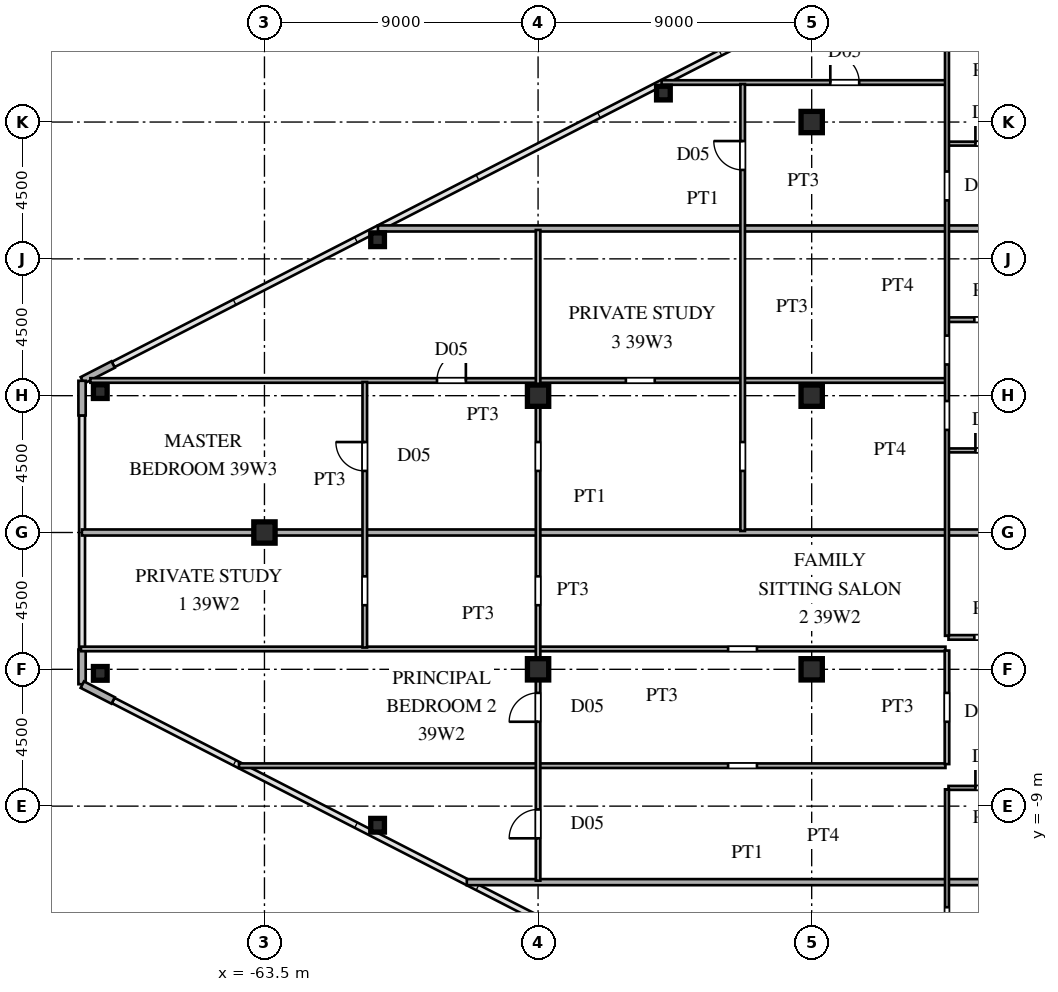
"""IFC4 building model, lengths in metres.
Left out: names, types, materials, properties, quantities, classifications, styles, units other than length and angle.
Written with IfcOpenShell. Run it as: python <this file> out.ifc"""

import sys

from ifc_helpers import new_model, si_unit, direction, frame, frame_2d, origin, origin_2d, place, context, subcontext, project, spatial, rectangle, hollow_rectangle, i_section, extrude, source, transform, mapped, element, fill, save


model = new_model("IFC4")
c1 = context("Model", 3, precision=1e-05, world=origin(), true_north=direction((0.0, 1.0)))
c2 = subcontext(c1, "Body", "Model", "MODEL_VIEW")
j1 = project(units=[si_unit("LENGTHUNIT", "METRE"), si_unit("PLANEANGLEUNIT", "RADIAN")], contexts=[c1])
p1 = place(None, origin())
s1 = spatial("IfcSite", under=j1, at=p1, CompositionType="ELEMENT")
p2 = place(p1, origin())
s2 = spatial("IfcBuilding", under=s1, at=p2, CompositionType="ELEMENT")
p3 = place(p2, frame((0.0, 0.0, 147.6)))
s3 = spatial("IfcBuildingStorey", under=s2, at=p3, CompositionType="ELEMENT", Elevation=147.6)
m1 = source(origin(), c2, "Body", "SweptSolid", [
    extrude(i_section(OverallWidth=0.7, OverallDepth=0.7, WebThickness=0.028, FlangeThickness=0.045, at=origin_2d()), origin(), (0.0, 0.0, 1.0), 3.6),
])
for number, where, z_axis, x_axis in (
    (1, (-45.5, -4.5, 0.0), (0.0, 0.0, 1.0), (1.0, 0.0, 0.0)),
    (2, (-45.5, 4.5, 0.0), (0.0, 0.0, 1.0), (1.0, 0.0, 0.0)),
    (3, (-45.5, 13.5, 0.0), (0.0, 0.0, 1.0), (1.0, 0.0, 0.0)),
    (4, (-54.5, -4.5, 0.0), (0.0, 0.0, 1.0), (1.0, 0.0, 0.0)),
    (5, (-54.5, 4.5, 0.0), (0.0, 0.0, 1.0), (1.0, 0.0, 0.0)),
    (6, (-63.5, 0.0, 0.0), (0.0, 0.0, 1.0), (1.0, 0.0, 0.0)),
):
    element("IfcColumn", number, at=place(p3, frame(where, z_axis=z_axis, x_axis=x_axis)), inside=s3, PredefinedType="COLUMN", context=c2, shape_type="MappedRepresentation", body=[
        mapped(m1, transform((0.0, 0.0, 0.0), scale=1.0)),
    ])
m2 = source(origin(), c2, "Body", "SweptSolid", [
    extrude(hollow_rectangle(XDim=0.45, YDim=0.45, WallThickness=0.018, at=origin_2d()), origin(), (0.0, 0.0, 1.0), 3.6),
])
for number, where, z_axis, x_axis in (
    (7, (-68.9, 4.634, 0.0), (0.0, 0.0, 1.0), (1.0, 0.0, 0.0)),
    (8, (-68.9, -4.634, 0.0), (0.0, 0.0, 1.0), (1.0, 0.0, 0.0)),
    (9, (-59.779, -9.629, 0.0), (0.0, 0.0, 1.0), (1.0, 0.0, 0.0)),
    (10, (-50.377, 14.453, 0.0), (0.0, 0.0, 1.0), (1.0, 0.0, 0.0)),
    (11, (-59.779, 9.629, 0.0), (0.0, 0.0, 1.0), (1.0, 0.0, 0.0)),
):
    element("IfcColumn", number, at=place(p3, frame(where, z_axis=z_axis, x_axis=x_axis)), inside=s3, PredefinedType="COLUMN", context=c2, shape_type="MappedRepresentation", body=[
        mapped(m2, transform((0.0, 0.0, 0.0), scale=1.0)),
    ])
p4 = place(p3, frame((-68.477, 5.525, 0.0), z_axis=(0.0, 0.0, 1.0), x_axis=(-0.889797395748, -0.456355776255, 0.0)))
e12 = element("IfcWall", 12, at=p4, inside=s3, PredefinedType="SOLIDWALL", context=c2, shape_type="SweptSolid", body=[
    extrude(rectangle(XDim=1.14, YDim=0.24, at=frame_2d((0.57, 0.0))), origin(), (0.0, 0.0, 1.0), 3.38),
])
for number, where, z_axis, x_axis in (
    (13, (-69.5, 4.99, 0.0), (0.0, 0.0, 1.0), (0.0, -1.0, 0.0)),
    (14, (-69.5, -3.85, 0.0), (0.0, 0.0, 1.0), (0.0, -1.0, 0.0)),
):
    element("IfcWall", number, at=place(p3, frame(where, z_axis=z_axis, x_axis=x_axis)), inside=s3, PredefinedType="SOLIDWALL", context=c2, shape_type="SweptSolid", body=[
        extrude(rectangle(XDim=1.14, YDim=0.24, at=frame_2d((0.57, 0.0))), origin(), (0.0, 0.0, 1.0), 3.38),
    ])
p5 = place(p3, frame((-69.491, -5.005, 0.0), z_axis=(0.0, 0.0, 1.0), x_axis=(0.889797395748, -0.456355776255, 0.0)))
e15 = element("IfcWall", 15, at=p5, inside=s3, PredefinedType="SOLIDWALL", context=c2, shape_type="SweptSolid", body=[
    extrude(rectangle(XDim=1.14, YDim=0.24, at=frame_2d((0.57, 0.0))), origin(), (0.0, 0.0, 1.0), 3.38),
])
p6 = place(p3, frame((-56.844, -11.5, 0.0), z_axis=(0.0, 0.0, 1.0), x_axis=(1.0, 0.0, 0.0)))
e16 = element("IfcWall", 16, at=p6, inside=s3, PredefinedType="PARTITIONING", context=c2, shape_type="SweptSolid", body=[
    extrude(rectangle(XDim=18.464, YDim=0.2, at=frame_2d((9.232, 0.0))), origin(), (0.0, 0.0, 1.0), 3.38),
])
p7 = place(p3, frame((-41.0, -8.4, 0.0), z_axis=(0.0, 0.0, 1.0), x_axis=(1.0, 0.0, 0.0)))
e17 = element("IfcWall", 17, at=p7, inside=s3, PredefinedType="PARTITIONING", context=c2, shape_type="SweptSolid", body=[
    extrude(rectangle(XDim=2.65, YDim=0.13, at=frame_2d((1.325, 0.0))), origin(), (0.0, 0.0, 1.0), 3.38),
])
p8 = place(p7, frame((0.885, 0.0, 0.0)))
e18 = element("IfcOpeningElement", 18, at=p8, cuts=e17, PredefinedType="OPENING", context=c2, shape_type="SweptSolid", body=[
    extrude(rectangle(XDim=0.88, YDim=2.1, at=frame_2d((0.44, 1.05))), frame((0.0, 0.075, 0.0), z_axis=(0.0, -1.0, 0.0), x_axis=(1.0, 0.0, 0.0)), (0.0, 0.0, 1.0), 0.15),
])
p9 = place(p3, frame((-64.338, -7.67, 0.0), z_axis=(0.0, 0.0, 1.0), x_axis=(1.0, 0.0, 0.0)))
e19 = element("IfcWall", 19, at=p9, inside=s3, PredefinedType="PARTITIONING", context=c2, shape_type="SweptSolid", body=[
    extrude(rectangle(XDim=23.238, YDim=0.15, at=frame_2d((11.619, 0.0))), origin(), (0.0, 0.0, 1.0), 3.38),
])
p10 = place(p9, frame((16.088, 0.0, 0.0)))
e20 = element("IfcOpeningElement", 20, at=p10, cuts=e19, PredefinedType="OPENING", context=c2, shape_type="SweptSolid", body=[
    extrude(rectangle(XDim=0.95, YDim=2.15, at=frame_2d((0.475, 1.075))), frame((0.0, 0.085, 0.0), z_axis=(0.0, -1.0, 0.0), x_axis=(1.0, 0.0, 0.0)), (0.0, 0.0, 1.0), 0.17),
])
p11 = place(p3, frame((-69.535, -3.83, 0.0), z_axis=(0.0, 0.0, 1.0), x_axis=(1.0, 0.0, 0.0)))
e21 = element("IfcWall", 21, at=p11, inside=s3, PredefinedType="PARTITIONING", context=c2, shape_type="SweptSolid", body=[
    extrude(rectangle(XDim=28.435, YDim=0.15, at=frame_2d((14.217, 0.0))), origin(), (0.0, 0.0, 1.0), 3.38),
])
p12 = place(p11, frame((21.285, 0.0, 0.0)))
e22 = element("IfcOpeningElement", 22, at=p12, cuts=e21, PredefinedType="OPENING", context=c2, shape_type="SweptSolid", body=[
    extrude(rectangle(XDim=0.95, YDim=2.15, at=frame_2d((0.475, 1.075))), frame((0.0, 0.085, 0.0), z_axis=(0.0, -1.0, 0.0), x_axis=(1.0, 0.0, 0.0)), (0.0, 0.0, 1.0), 0.17),
])
p13 = place(p3, frame((-41.0, -3.45, 0.0), z_axis=(0.0, 0.0, 1.0), x_axis=(1.0, 0.0, 0.0)))
e23 = element("IfcWall", 23, at=p13, inside=s3, PredefinedType="PARTITIONING", context=c2, shape_type="SweptSolid", body=[
    extrude(rectangle(XDim=2.65, YDim=0.15, at=frame_2d((1.325, 0.0))), origin(), (0.0, 0.0, 1.0), 3.38),
])
p14 = place(p13, frame((0.85, 0.0, 0.0)))
e24 = element("IfcOpeningElement", 24, at=p14, cuts=e23, PredefinedType="OPENING", context=c2, shape_type="SweptSolid", body=[
    extrude(rectangle(XDim=0.95, YDim=2.15, at=frame_2d((0.475, 1.075))), frame((0.0, 0.085, 0.0), z_axis=(0.0, -1.0, 0.0), x_axis=(1.0, 0.0, 0.0)), (0.0, 0.0, 1.0), 0.17),
])
p15 = place(p3, frame((-69.505, 0.0, 0.0), z_axis=(0.0, 0.0, 1.0), x_axis=(1.0, 0.0, 0.0)))
e25 = element("IfcWall", 25, at=p15, inside=s3, PredefinedType="PARTITIONING", context=c2, shape_type="SweptSolid", body=[
    extrude(rectangle(XDim=31.125, YDim=0.2, at=frame_2d((15.562, 0.0))), origin(), (0.0, 0.0, 1.0), 3.38),
])
p16 = place(p3, frame((-41.0, 2.7, 0.0), z_axis=(0.0, 0.0, 1.0), x_axis=(1.0, 0.0, 0.0)))
e26 = element("IfcWall", 26, at=p16, inside=s3, PredefinedType="PARTITIONING", context=c2, shape_type="SweptSolid", body=[
    extrude(rectangle(XDim=2.65, YDim=0.13, at=frame_2d((1.325, 0.0))), origin(), (0.0, 0.0, 1.0), 3.38),
])
p17 = place(p16, frame((0.885, 0.0, 0.0)))
e27 = element("IfcOpeningElement", 27, at=p17, cuts=e26, PredefinedType="OPENING", context=c2, shape_type="SweptSolid", body=[
    extrude(rectangle(XDim=0.88, YDim=2.1, at=frame_2d((0.44, 1.05))), frame((0.0, 0.075, 0.0), z_axis=(0.0, -1.0, 0.0), x_axis=(1.0, 0.0, 0.0)), (0.0, 0.0, 1.0), 0.15),
])
p18 = place(p3, frame((-69.226, 5.0, 0.0), z_axis=(0.0, 0.0, 1.0), x_axis=(1.0, 0.0, 0.0)))
e28 = element("IfcWall", 28, at=p18, inside=s3, PredefinedType="PARTITIONING", context=c2, shape_type="SweptSolid", body=[
    extrude(rectangle(XDim=28.126, YDim=0.15, at=frame_2d((14.063, 0.0))), origin(), (0.0, 0.0, 1.0), 3.38),
])
p19 = place(p18, frame((11.401, 0.0, 0.0)))
e29 = element("IfcOpeningElement", 29, at=p19, cuts=e28, PredefinedType="OPENING", context=c2, shape_type="SweptSolid", body=[
    extrude(rectangle(XDim=0.95, YDim=2.15, at=frame_2d((0.475, 1.075))), frame((0.0, 0.085, 0.0), z_axis=(0.0, -1.0, 0.0), x_axis=(1.0, 0.0, 0.0)), (0.0, 0.0, 1.0), 0.17),
])
p20 = place(p18, frame((17.614, 0.0, 0.0)))
e30 = element("IfcOpeningElement", 30, at=p20, cuts=e28, PredefinedType="OPENING", context=c2, shape_type="SweptSolid", body=[
    extrude(rectangle(XDim=0.95, YDim=2.15, at=frame_2d((0.475, 1.075))), frame((0.0, 0.085, 0.0), z_axis=(0.0, -1.0, 0.0), x_axis=(1.0, 0.0, 0.0)), (0.0, 0.0, 1.0), 0.17),
])
p21 = place(p3, frame((-41.0, 7.0, 0.0), z_axis=(0.0, 0.0, 1.0), x_axis=(1.0, 0.0, 0.0)))
e31 = element("IfcWall", 31, at=p21, inside=s3, PredefinedType="PARTITIONING", context=c2, shape_type="SweptSolid", body=[
    extrude(rectangle(XDim=2.65, YDim=0.15, at=frame_2d((1.325, 0.0))), origin(), (0.0, 0.0, 1.0), 3.38),
])
p22 = place(p21, frame((0.85, 0.0, 0.0)))
e32 = element("IfcOpeningElement", 32, at=p22, cuts=e31, PredefinedType="OPENING", context=c2, shape_type="SweptSolid", body=[
    extrude(rectangle(XDim=0.95, YDim=2.15, at=frame_2d((0.475, 1.075))), frame((0.0, 0.085, 0.0), z_axis=(0.0, -1.0, 0.0), x_axis=(1.0, 0.0, 0.0)), (0.0, 0.0, 1.0), 0.17),
])
p23 = place(p3, frame((-59.767, 10.0, 0.0), z_axis=(0.0, 0.0, 1.0), x_axis=(1.0, 0.0, 0.0)))
e33 = element("IfcWall", 33, at=p23, inside=s3, PredefinedType="PARTITIONING", context=c2, shape_type="SweptSolid", body=[
    extrude(rectangle(XDim=21.387, YDim=0.2, at=frame_2d((10.694, 0.0))), origin(), (0.0, 0.0, 1.0), 3.38),
])
p24 = place(p3, frame((-41.0, 12.79, 0.0), z_axis=(0.0, 0.0, 1.0), x_axis=(1.0, 0.0, 0.0)))
e34 = element("IfcWall", 34, at=p24, inside=s3, PredefinedType="PARTITIONING", context=c2, shape_type="SweptSolid", body=[
    extrude(rectangle(XDim=2.65, YDim=0.13, at=frame_2d((1.325, 0.0))), origin(), (0.0, 0.0, 1.0), 3.38),
])
p25 = place(p24, frame((0.885, 0.0, 0.0)))
e35 = element("IfcOpeningElement", 35, at=p25, cuts=e34, PredefinedType="OPENING", context=c2, shape_type="SweptSolid", body=[
    extrude(rectangle(XDim=0.88, YDim=2.1, at=frame_2d((0.44, 1.05))), frame((0.0, 0.075, 0.0), z_axis=(0.0, -1.0, 0.0), x_axis=(1.0, 0.0, 0.0)), (0.0, 0.0, 1.0), 0.15),
])
p26 = place(p3, frame((-50.438, 14.8, 0.0), z_axis=(0.0, 0.0, 1.0), x_axis=(1.0, 0.0, 0.0)))
e36 = element("IfcWall", 36, at=p26, inside=s3, PredefinedType="PARTITIONING", context=c2, shape_type="SweptSolid", body=[
    extrude(rectangle(XDim=9.338, YDim=0.15, at=frame_2d((4.669, 0.0))), origin(), (0.0, 0.0, 1.0), 3.38),
])
p27 = place(p26, frame((5.551, 0.0, 0.0)))
e37 = element("IfcOpeningElement", 37, at=p27, cuts=e36, PredefinedType="OPENING", context=c2, shape_type="SweptSolid", body=[
    extrude(rectangle(XDim=0.95, YDim=2.15, at=frame_2d((0.475, 1.075))), frame((0.0, 0.085, 0.0), z_axis=(0.0, -1.0, 0.0), x_axis=(1.0, 0.0, 0.0)), (0.0, 0.0, 1.0), 0.17),
])
p28 = place(p3, frame((-60.2, -3.783, 0.0), z_axis=(0.0, 0.0, 1.0), x_axis=(0.0, 1.0, 0.0)))
e38 = element("IfcWall", 38, at=p28, inside=s3, PredefinedType="PARTITIONING", context=c2, shape_type="SweptSolid", body=[
    extrude(rectangle(XDim=8.733, YDim=0.15, at=frame_2d((4.366, 0.0))), origin(), (0.0, 0.0, 1.0), 3.38),
])
p29 = place(p28, frame((1.391, 0.0, 0.0)))
e39 = element("IfcOpeningElement", 39, at=p29, cuts=e38, PredefinedType="OPENING", context=c2, shape_type="SweptSolid", body=[
    extrude(rectangle(XDim=0.95, YDim=2.15, at=frame_2d((0.475, 1.075))), frame((0.0, 0.085, 0.0), z_axis=(0.0, -1.0, 0.0), x_axis=(1.0, 0.0, 0.0)), (0.0, 0.0, 1.0), 0.17),
])
p30 = place(p28, frame((5.808, 0.0, 0.0)))
e40 = element("IfcOpeningElement", 40, at=p30, cuts=e38, PredefinedType="OPENING", context=c2, shape_type="SweptSolid", body=[
    extrude(rectangle(XDim=0.95, YDim=2.15, at=frame_2d((0.475, 1.075))), frame((0.0, 0.085, 0.0), z_axis=(0.0, -1.0, 0.0), x_axis=(1.0, 0.0, 0.0)), (0.0, 0.0, 1.0), 0.17),
])
p31 = place(p3, frame((-54.5, -11.45, 0.0), z_axis=(0.0, 0.0, 1.0), x_axis=(0.0, 1.0, 0.0)))
e41 = element("IfcWall", 41, at=p31, inside=s3, PredefinedType="PARTITIONING", context=c2, shape_type="SweptSolid", body=[
    extrude(rectangle(XDim=21.4, YDim=0.15, at=frame_2d((10.7, 0.0))), origin(), (0.0, 0.0, 1.0), 2.78),
])
p32 = place(p31, frame((5.225, 0.0, 0.0)))
e42 = element("IfcOpeningElement", 42, at=p32, cuts=e41, PredefinedType="OPENING", context=c2, shape_type="SweptSolid", body=[
    extrude(rectangle(XDim=0.95, YDim=2.15, at=frame_2d((0.475, 1.075))), frame((0.0, 0.085, 0.0), z_axis=(0.0, -1.0, 0.0), x_axis=(1.0, 0.0, 0.0)), (0.0, 0.0, 1.0), 0.17),
])
p33 = place(p31, frame((1.392, 0.0, 0.0)))
e43 = element("IfcOpeningElement", 43, at=p33, cuts=e41, PredefinedType="OPENING", context=c2, shape_type="SweptSolid", body=[
    extrude(rectangle(XDim=0.95, YDim=2.15, at=frame_2d((0.475, 1.075))), frame((0.0, 0.085, 0.0), z_axis=(0.0, -1.0, 0.0), x_axis=(1.0, 0.0, 0.0)), (0.0, 0.0, 1.0), 0.17),
])
p34 = place(p31, frame((9.058, 0.0, 0.0)))
e44 = element("IfcOpeningElement", 44, at=p34, cuts=e41, PredefinedType="OPENING", context=c2, shape_type="SweptSolid", body=[
    extrude(rectangle(XDim=0.95, YDim=2.15, at=frame_2d((0.475, 1.075))), frame((0.0, 0.085, 0.0), z_axis=(0.0, -1.0, 0.0), x_axis=(1.0, 0.0, 0.0)), (0.0, 0.0, 1.0), 0.17),
])
p35 = place(p31, frame((13.475, 0.0, 0.0)))
e45 = element("IfcOpeningElement", 45, at=p35, cuts=e41, PredefinedType="OPENING", context=c2, shape_type="SweptSolid", body=[
    extrude(rectangle(XDim=0.95, YDim=2.15, at=frame_2d((0.475, 1.075))), frame((0.0, 0.085, 0.0), z_axis=(0.0, -1.0, 0.0), x_axis=(1.0, 0.0, 0.0)), (0.0, 0.0, 1.0), 0.17),
])
p36 = place(p3, frame((-47.77, 0.05, 0.0), z_axis=(0.0, 0.0, 1.0), x_axis=(0.0, 1.0, 0.0)))
e46 = element("IfcWall", 46, at=p36, inside=s3, PredefinedType="PARTITIONING", context=c2, shape_type="SweptSolid", body=[
    extrude(rectangle(XDim=14.7, YDim=0.15, at=frame_2d((7.35, 0.0))), origin(), (0.0, 0.0, 1.0), 3.38),
])
p37 = place(p36, frame((1.975, 0.0, 0.0)))
e47 = element("IfcOpeningElement", 47, at=p37, cuts=e46, PredefinedType="OPENING", context=c2, shape_type="SweptSolid", body=[
    extrude(rectangle(XDim=0.95, YDim=2.15, at=frame_2d((0.475, 1.075))), frame((0.0, 0.085, 0.0), z_axis=(0.0, -1.0, 0.0), x_axis=(1.0, 0.0, 0.0)), (0.0, 0.0, 1.0), 0.17),
])
p38 = place(p36, frame((11.875, 0.0, 0.0)))
e48 = element("IfcOpeningElement", 48, at=p38, cuts=e46, PredefinedType="OPENING", context=c2, shape_type="SweptSolid", body=[
    extrude(rectangle(XDim=0.95, YDim=2.15, at=frame_2d((0.475, 1.075))), frame((0.0, 0.085, 0.0), z_axis=(0.0, -1.0, 0.0), x_axis=(1.0, 0.0, 0.0)), (0.0, 0.0, 1.0), 0.17),
])
p39 = place(p3, frame((-41.05, -19.634, 0.0), z_axis=(0.0, 0.0, 1.0), x_axis=(0.0, 1.0, 0.0)))
e49 = element("IfcWall", 49, at=p39, inside=s3, PredefinedType="PARTITIONING", context=c2, shape_type="SweptSolid", body=[
    extrude(rectangle(XDim=11.187, YDim=0.13, at=frame_2d((5.594, 0.0))), origin(), (0.0, 0.0, 1.0), 2.99),
])
p40 = place(p39, frame((6.359, 0.0, 0.0)))
e50 = element("IfcOpeningElement", 50, at=p40, cuts=e49, PredefinedType="OPENING", context=c2, shape_type="SweptSolid", body=[
    extrude(rectangle(XDim=0.95, YDim=2.15, at=frame_2d((0.475, 1.075))), frame((0.0, 0.075, 0.0), z_axis=(0.0, -1.0, 0.0), x_axis=(1.0, 0.0, 0.0)), (0.0, 0.0, 1.0), 0.15),
])
p41 = place(p39, frame((0.809, 0.0, 0.0)))
e51 = element("IfcOpeningElement", 51, at=p41, cuts=e49, PredefinedType="OPENING", context=c2, shape_type="SweptSolid", body=[
    extrude(rectangle(XDim=0.95, YDim=2.15, at=frame_2d((0.475, 1.075))), frame((0.0, 0.075, 0.0), z_axis=(0.0, -1.0, 0.0), x_axis=(1.0, 0.0, 0.0)), (0.0, 0.0, 1.0), 0.15),
])
p42 = place(p3, frame((-41.05, -7.617, 0.0), z_axis=(0.0, 0.0, 1.0), x_axis=(0.0, 1.0, 0.0)))
e52 = element("IfcWall", 52, at=p42, inside=s3, PredefinedType="PARTITIONING", context=c2, shape_type="SweptSolid", body=[
    extrude(rectangle(XDim=3.734, YDim=0.15, at=frame_2d((1.867, 0.0))), origin(), (0.0, 0.0, 1.0), 2.99),
])
p43 = place(p42, frame((1.392, 0.0, 0.0)))
e53 = element("IfcOpeningElement", 53, at=p43, cuts=e52, PredefinedType="OPENING", context=c2, shape_type="SweptSolid", body=[
    extrude(rectangle(XDim=0.95, YDim=2.15, at=frame_2d((0.475, 1.075))), frame((0.0, 0.085, 0.0), z_axis=(0.0, -1.0, 0.0), x_axis=(1.0, 0.0, 0.0)), (0.0, 0.0, 1.0), 0.17),
])
p44 = place(p3, frame((-41.05, -3.398, 0.0), z_axis=(0.0, 0.0, 1.0), x_axis=(0.0, 1.0, 0.0)))
e54 = element("IfcWall", 54, at=p44, inside=s3, PredefinedType="PARTITIONING", context=c2, shape_type="SweptSolid", body=[
    extrude(rectangle(XDim=23.032, YDim=0.13, at=frame_2d((11.516, 0.0))), origin(), (0.0, 0.0, 1.0), 2.99),
])
p45 = place(p44, frame((6.772, 0.0, 0.0)))
e55 = element("IfcOpeningElement", 55, at=p45, cuts=e54, PredefinedType="OPENING", context=c2, shape_type="SweptSolid", body=[
    extrude(rectangle(XDim=0.95, YDim=2.15, at=frame_2d((0.475, 1.075))), frame((0.0, 0.075, 0.0), z_axis=(0.0, -1.0, 0.0), x_axis=(1.0, 0.0, 0.0)), (0.0, 0.0, 1.0), 0.15),
])
p46 = place(p44, frame((8.924, 0.0, 0.0)))
e56 = element("IfcOpeningElement", 56, at=p46, cuts=e54, PredefinedType="OPENING", context=c2, shape_type="SweptSolid", body=[
    extrude(rectangle(XDim=0.95, YDim=2.15, at=frame_2d((0.475, 1.075))), frame((0.0, 0.075, 0.0), z_axis=(0.0, -1.0, 0.0), x_axis=(1.0, 0.0, 0.0)), (0.0, 0.0, 1.0), 0.15),
])
p47 = place(p44, frame((14.321, 0.0, 0.0)))
e57 = element("IfcOpeningElement", 57, at=p47, cuts=e54, PredefinedType="OPENING", context=c2, shape_type="SweptSolid", body=[
    extrude(rectangle(XDim=0.95, YDim=2.15, at=frame_2d((0.475, 1.075))), frame((0.0, 0.075, 0.0), z_axis=(0.0, -1.0, 0.0), x_axis=(1.0, 0.0, 0.0)), (0.0, 0.0, 1.0), 0.15),
])
p48 = place(p44, frame((21.273, 0.0, 0.0)))
e58 = element("IfcOpeningElement", 58, at=p48, cuts=e54, PredefinedType="OPENING", context=c2, shape_type="SweptSolid", body=[
    extrude(rectangle(XDim=0.95, YDim=2.15, at=frame_2d((0.475, 1.075))), frame((0.0, 0.075, 0.0), z_axis=(0.0, -1.0, 0.0), x_axis=(1.0, 0.0, 0.0)), (0.0, 0.0, 1.0), 0.15),
])
m3 = source(origin(), c2, "Body", "SweptSolid", [
    extrude(rectangle(XDim=0.88, YDim=2.1, at=frame_2d((0.44, 1.05))), frame((0.0, 0.025, 0.0), z_axis=(0.0, -1.0, 0.0), x_axis=(1.0, 0.0, 0.0)), (0.0, 0.0, 1.0), 0.05),
])
p49 = place(p8, origin())
e59 = element("IfcDoor", 59, at=p49, inside=s3, OperationType="SINGLE_SWING_LEFT", PredefinedType="DOOR", context=c2, shape_type="MappedRepresentation", body=[
    mapped(m3, transform((0.0, 0.0, 0.0), scale=1.0)),
])
fill(e18, e59)
p50 = place(p17, origin())
e60 = element("IfcDoor", 60, at=p50, inside=s3, OperationType="SINGLE_SWING_LEFT", PredefinedType="DOOR", context=c2, shape_type="MappedRepresentation", body=[
    mapped(m3, transform((0.0, 0.0, 0.0), scale=1.0)),
])
fill(e27, e60)
m4 = source(origin(), c2, "Body", "SweptSolid", [
    extrude(rectangle(XDim=0.95, YDim=2.15, at=frame_2d((0.475, 1.075))), frame((0.0, 0.025, 0.0), z_axis=(0.0, -1.0, 0.0), x_axis=(1.0, 0.0, 0.0)), (0.0, 0.0, 1.0), 0.05),
])
p51 = place(p19, origin())
e61 = element("IfcDoor", 61, at=p51, inside=s3, OperationType="SINGLE_SWING_RIGHT", PredefinedType="DOOR", context=c2, shape_type="MappedRepresentation", body=[
    mapped(m4, transform((0.0, 0.0, 0.0), scale=1.0)),
])
fill(e29, e61)
p52 = place(p25, origin())
e62 = element("IfcDoor", 62, at=p52, inside=s3, OperationType="SINGLE_SWING_LEFT", PredefinedType="DOOR", context=c2, shape_type="MappedRepresentation", body=[
    mapped(m3, transform((0.0, 0.0, 0.0), scale=1.0)),
])
fill(e35, e62)
p53 = place(p27, origin())
e63 = element("IfcDoor", 63, at=p53, inside=s3, OperationType="SINGLE_SWING_LEFT", PredefinedType="DOOR", context=c2, shape_type="MappedRepresentation", body=[
    mapped(m4, transform((0.0, 0.0, 0.0), scale=1.0)),
])
fill(e37, e63)
p54 = place(p30, origin())
e64 = element("IfcDoor", 64, at=p54, inside=s3, OperationType="SINGLE_SWING_RIGHT", PredefinedType="DOOR", context=c2, shape_type="MappedRepresentation", body=[
    mapped(m4, transform((0.0, 0.0, 0.0), scale=1.0)),
])
fill(e40, e64)
p55 = place(p32, origin())
e65 = element("IfcDoor", 65, at=p55, inside=s3, OperationType="SINGLE_SWING_LEFT", PredefinedType="DOOR", context=c2, shape_type="MappedRepresentation", body=[
    mapped(m4, transform((0.0, 0.0, 0.0), scale=1.0)),
])
fill(e42, e65)
p56 = place(p33, origin())
e66 = element("IfcDoor", 66, at=p56, inside=s3, OperationType="SINGLE_SWING_LEFT", PredefinedType="DOOR", context=c2, shape_type="MappedRepresentation", body=[
    mapped(m4, transform((0.0, 0.0, 0.0), scale=1.0)),
])
fill(e43, e66)
p57 = place(p38, origin())
e67 = element("IfcDoor", 67, at=p57, inside=s3, OperationType="SINGLE_SWING_RIGHT", PredefinedType="DOOR", context=c2, shape_type="MappedRepresentation", body=[
    mapped(m4, transform((0.0, 0.0, 0.0), scale=1.0)),
])
fill(e48, e67)
save(model, sys.argv[1])
